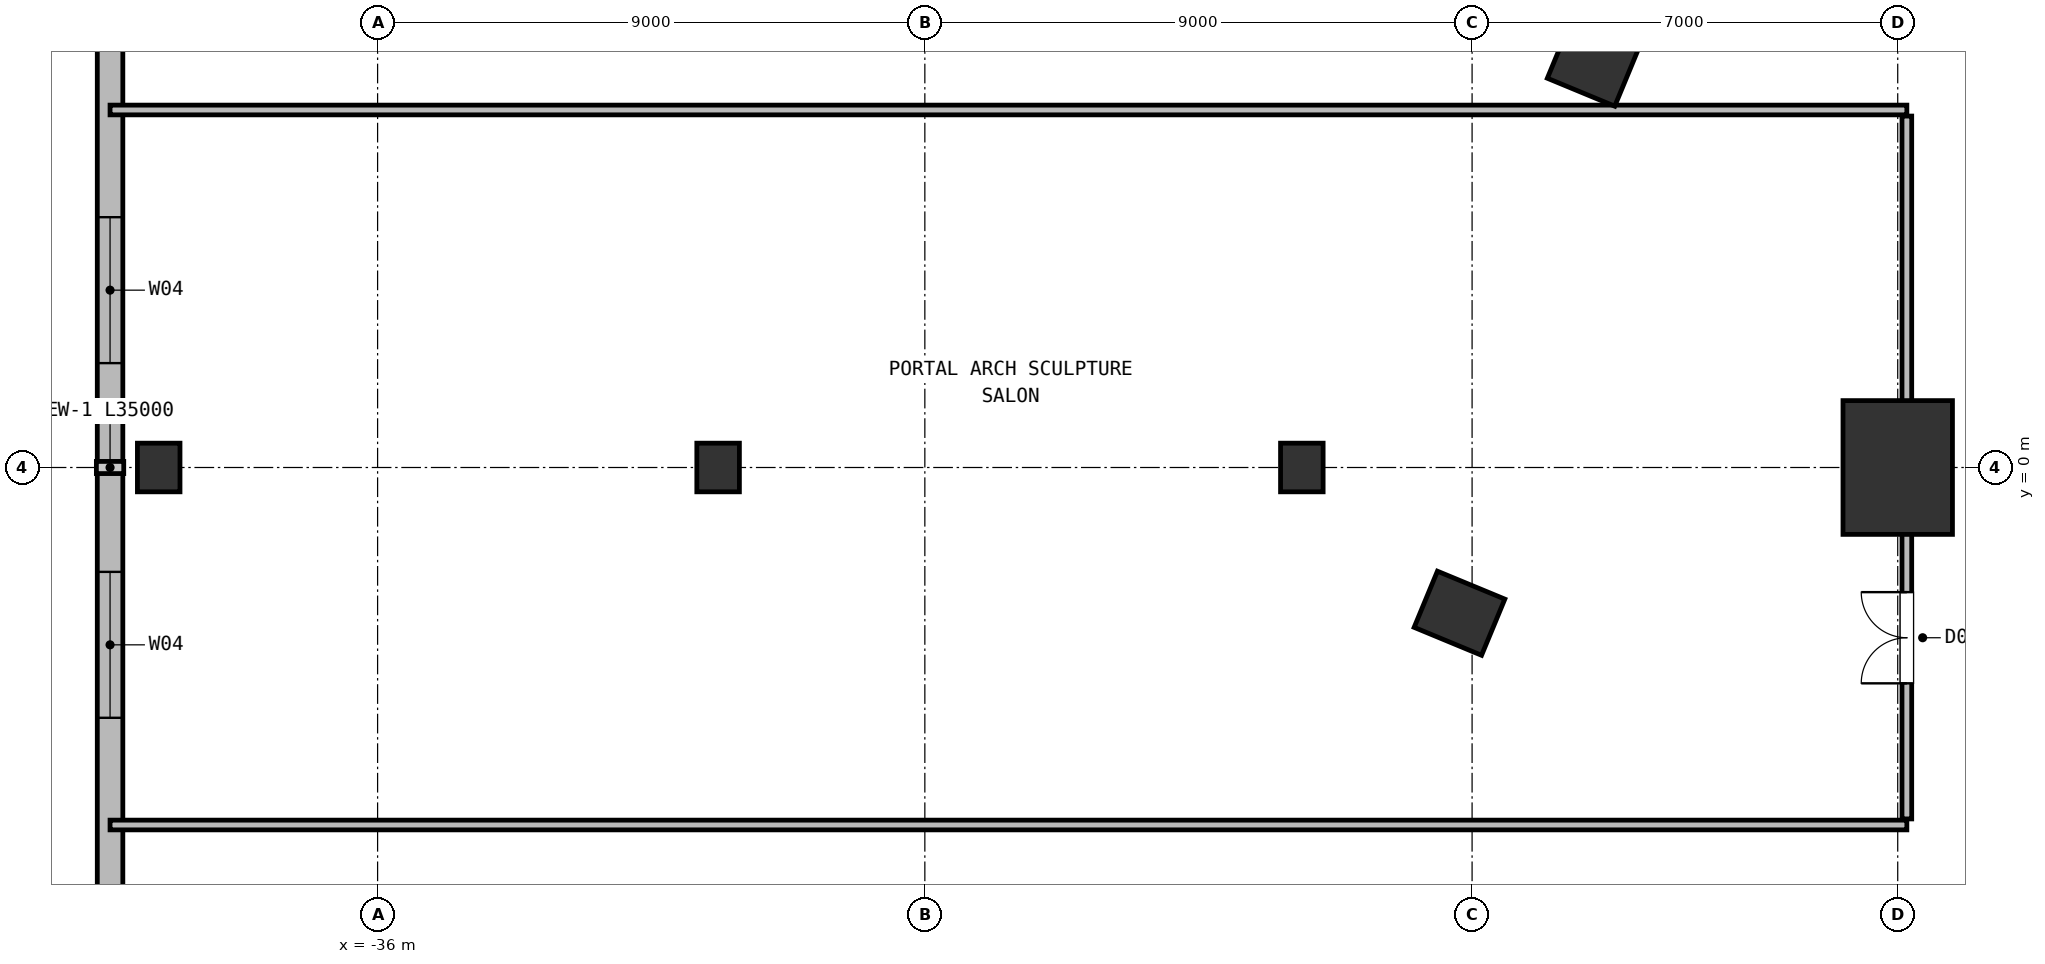
"""IFC4 building model, lengths in metres.
Left out: names, types, materials, properties, quantities, classifications, styles, units other than length and angle.
Written with IfcOpenShell. Run it as: python <this file> out.ifc"""

import sys

from ifc_helpers import new_model, si_unit, direction, frame, frame_2d, origin, origin_2d, place, context, subcontext, project, spatial, rectangle, extrude, element, fill, save


model = new_model("IFC4")
c1 = context("Model", 3, precision=1e-05, world=origin(), true_north=direction((0.0, 1.0)))
c2 = subcontext(c1, "Body", "Model", "MODEL_VIEW")
j1 = project(units=[si_unit("LENGTHUNIT", "METRE"), si_unit("PLANEANGLEUNIT", "RADIAN")], contexts=[c1])
p1 = place(None, origin())
s1 = spatial("IfcSite", under=j1, at=p1, CompositionType="ELEMENT")
p2 = place(p1, origin())
s2 = spatial("IfcBuilding", under=s1, at=p2, CompositionType="ELEMENT")
p3 = place(p2, frame((0.0, 0.0, 11.0)))
s3 = spatial("IfcBuildingStorey", under=s2, at=p3, CompositionType="ELEMENT", Elevation=11.0)
for number, where, z_axis, x_axis in (
    (1, (-16.017, 6.635, 0.0), (0.0, 0.0, 1.0), (0.383, 0.924, 0.0)),
    (2, (-18.207, -2.397, 0.0), (0.0, 0.0, 1.0), (0.383, 0.924, 0.0)),
):
    element("IfcColumn", number, at=place(p3, frame(where, z_axis=z_axis, x_axis=x_axis)), inside=s3, PredefinedType="COLUMN", context=c2, shape_type="SweptSolid", body=[
        extrude(rectangle(XDim=1.0, YDim=1.2, at=origin_2d()), origin(), (0.0, 0.0, 1.0), 5.0),
    ])
for number, where, z_axis, x_axis in (
    (3, (-39.6, 0.0, 0.0), (0.0, 0.0, 1.0), (1.0, 0.0, 0.0)),
    (4, (-30.4, 0.0, 0.0), (0.0, 0.0, 1.0), (1.0, 0.0, 0.0)),
    (5, (-20.8, 0.0, 0.0), (0.0, 0.0, 1.0), (1.0, 0.0, 0.0)),
):
    element("IfcColumn", number, at=place(p3, frame(where, z_axis=z_axis, x_axis=x_axis)), inside=s3, PredefinedType="COLUMN", context=c2, shape_type="SweptSolid", body=[
        extrude(rectangle(XDim=0.7, YDim=0.8, at=origin_2d()), origin(), (0.0, 0.0, 1.0), 5.0),
    ])
p4 = place(p3, frame((-11.0, 0.0, 0.0), z_axis=(0.0, 0.0, 1.0), x_axis=(1.0, 0.0, 0.0)))
e6 = element("IfcColumn", 6, at=p4, inside=s3, PredefinedType="COLUMN", context=c2, shape_type="SweptSolid", body=[
    extrude(rectangle(XDim=1.8, YDim=2.2, at=origin_2d()), origin(), (0.0, 0.0, 1.0), 5.0),
])
p5 = place(p3, frame((-40.4, -17.5, 0.0), z_axis=(0.0, 0.0, 1.0), x_axis=(0.0, 1.0, 0.0)))
e7 = element("IfcWall", 7, at=p5, inside=s3, PredefinedType="SOLIDWALL", context=c2, shape_type="SweptSolid", body=[
    extrude(rectangle(XDim=35.0, YDim=0.42, at=frame_2d((17.5, 0.0))), origin(), (0.0, 0.0, 1.0), 4.66),
])
p6 = place(p5, frame((1.717, 0.0, 0.95)))
e8 = element("IfcOpeningElement", 8, at=p6, cuts=e7, PredefinedType="OPENING", context=c2, shape_type="SweptSolid", body=[
    extrude(rectangle(XDim=2.4, YDim=2.6, at=frame_2d((1.2, 1.3))), frame((0.0, 0.22, 0.0), z_axis=(0.0, -1.0, 0.0), x_axis=(1.0, 0.0, 0.0)), (0.0, 0.0, 1.0), 0.44),
])
p7 = place(p5, frame((4.6, 0.0, 0.95)))
e9 = element("IfcOpeningElement", 9, at=p7, cuts=e7, PredefinedType="OPENING", context=c2, shape_type="SweptSolid", body=[
    extrude(rectangle(XDim=2.4, YDim=2.6, at=frame_2d((1.2, 1.3))), frame((0.0, 0.22, 0.0), z_axis=(0.0, -1.0, 0.0), x_axis=(1.0, 0.0, 0.0)), (0.0, 0.0, 1.0), 0.44),
])
p8 = place(p5, frame((13.383, 0.0, 0.95)))
e10 = element("IfcOpeningElement", 10, at=p8, cuts=e7, PredefinedType="OPENING", context=c2, shape_type="SweptSolid", body=[
    extrude(rectangle(XDim=2.4, YDim=2.6, at=frame_2d((1.2, 1.3))), frame((0.0, 0.22, 0.0), z_axis=(0.0, -1.0, 0.0), x_axis=(1.0, 0.0, 0.0)), (0.0, 0.0, 1.0), 0.44),
])
p9 = place(p5, frame((19.217, 0.0, 0.95)))
e11 = element("IfcOpeningElement", 11, at=p9, cuts=e7, PredefinedType="OPENING", context=c2, shape_type="SweptSolid", body=[
    extrude(rectangle(XDim=2.4, YDim=2.6, at=frame_2d((1.2, 1.3))), frame((0.0, 0.22, 0.0), z_axis=(0.0, -1.0, 0.0), x_axis=(1.0, 0.0, 0.0)), (0.0, 0.0, 1.0), 0.44),
])
p10 = place(p5, frame((28.0, 0.0, 0.95)))
e12 = element("IfcOpeningElement", 12, at=p10, cuts=e7, PredefinedType="OPENING", context=c2, shape_type="SweptSolid", body=[
    extrude(rectangle(XDim=2.4, YDim=2.6, at=frame_2d((1.2, 1.3))), frame((0.0, 0.22, 0.0), z_axis=(0.0, -1.0, 0.0), x_axis=(1.0, 0.0, 0.0)), (0.0, 0.0, 1.0), 0.44),
])
p11 = place(p5, frame((30.883, 0.0, 0.95)))
e13 = element("IfcOpeningElement", 13, at=p11, cuts=e7, PredefinedType="OPENING", context=c2, shape_type="SweptSolid", body=[
    extrude(rectangle(XDim=2.4, YDim=2.6, at=frame_2d((1.2, 1.3))), frame((0.0, 0.22, 0.0), z_axis=(0.0, -1.0, 0.0), x_axis=(1.0, 0.0, 0.0)), (0.0, 0.0, 1.0), 0.44),
])
for number, where, z_axis, x_axis in (
    (14, (-10.85, 5.88, 0.0), (0.0, 0.0, 1.0), (-1.0, 0.0, 0.0)),
    (15, (-40.4, -5.88, 0.0), (0.0, 0.0, 1.0), (1.0, 0.0, 0.0)),
):
    element("IfcWall", number, at=place(p3, frame(where, z_axis=z_axis, x_axis=x_axis)), inside=s3, PredefinedType="PARTITIONING", context=c2, shape_type="SweptSolid", body=[
        extrude(rectangle(XDim=29.55, YDim=0.16, at=frame_2d((14.775, 0.0))), origin(), (0.0, 0.0, 1.0), 4.66),
    ])
p12 = place(p3, frame((-10.85, -5.78, 0.0), z_axis=(0.0, 0.0, 1.0), x_axis=(0.0, 1.0, 0.0)))
e16 = element("IfcWall", 16, at=p12, inside=s3, PredefinedType="PARTITIONING", context=c2, shape_type="SweptSolid", body=[
    extrude(rectangle(XDim=11.56, YDim=0.16, at=frame_2d((5.78, 0.0))), origin(), (0.0, 0.0, 1.0), 2.84),
])
p13 = place(p12, frame((2.23, 0.0, 0.0)))
e17 = element("IfcOpeningElement", 17, at=p13, cuts=e16, PredefinedType="OPENING", context=c2, shape_type="SweptSolid", body=[
    extrude(rectangle(XDim=1.5, YDim=2.2, at=frame_2d((0.75, 1.1))), frame((0.0, 0.09, 0.0), z_axis=(0.0, -1.0, 0.0), x_axis=(1.0, 0.0, 0.0)), (0.0, 0.0, 1.0), 0.18),
])
p14 = place(p8, origin())
e18 = element("IfcWindow", 18, at=p14, inside=s3, PartitioningType="SINGLE_PANEL", PredefinedType="WINDOW", context=c2, shape_type="SweptSolid", body=[
    extrude(rectangle(XDim=2.4, YDim=2.6, at=frame_2d((1.2, 1.3))), frame((0.0, 0.03, 0.0), z_axis=(0.0, -1.0, 0.0), x_axis=(1.0, 0.0, 0.0)), (0.0, 0.0, 1.0), 0.06),
])
fill(e10, e18)
p15 = place(p9, origin())
e19 = element("IfcWindow", 19, at=p15, inside=s3, PartitioningType="SINGLE_PANEL", PredefinedType="WINDOW", context=c2, shape_type="SweptSolid", body=[
    extrude(rectangle(XDim=2.4, YDim=2.6, at=frame_2d((1.2, 1.3))), frame((0.0, 0.03, 0.0), z_axis=(0.0, -1.0, 0.0), x_axis=(1.0, 0.0, 0.0)), (0.0, 0.0, 1.0), 0.06),
])
fill(e11, e19)
p16 = place(p13, origin())
e20 = element("IfcDoor", 20, at=p16, inside=s3, OperationType="DOUBLE_DOOR_SINGLE_SWING", PredefinedType="DOOR", context=c2, shape_type="SweptSolid", body=[
    extrude(rectangle(XDim=1.5, YDim=2.2, at=frame_2d((0.75, 1.1))), frame((0.0, 0.025, 0.0), z_axis=(0.0, -1.0, 0.0), x_axis=(1.0, 0.0, 0.0)), (0.0, 0.0, 1.0), 0.05),
])
fill(e17, e20)
save(model, sys.argv[1])
